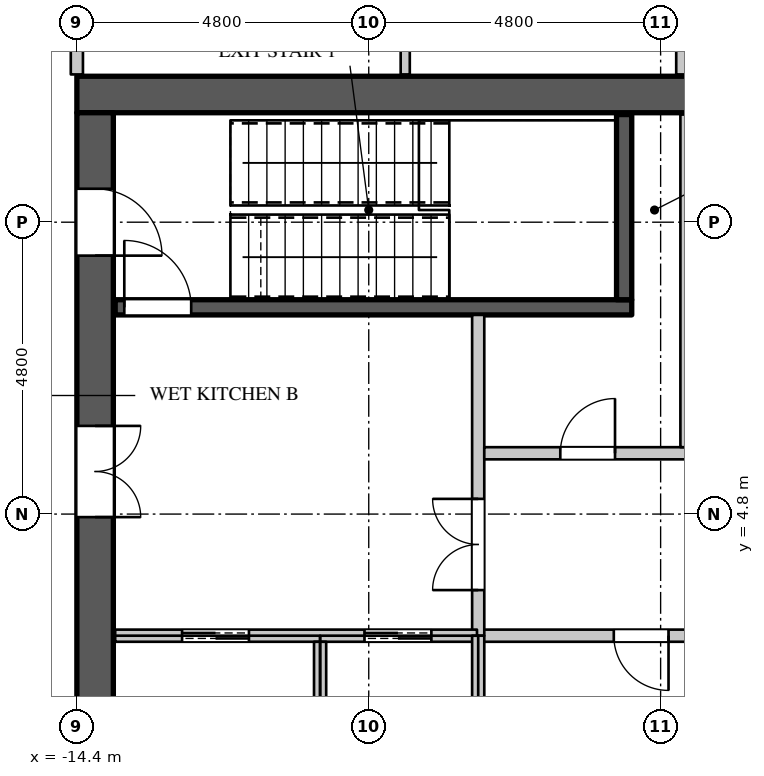
"""IFC4 building model, lengths in metres.
Left out: names, types, materials, properties, quantities, classifications, styles, units other than length and angle.
Written with IfcOpenShell. Run it as: python <this file> out.ifc"""

import sys

from ifc_helpers import new_model, si_unit, direction, frame, frame_2d, origin, place, context, subcontext, project, spatial, rectangle, extrude, element, fill, save


model = new_model("IFC4")
c1 = context("Model", 3, precision=1e-05, world=origin(), true_north=direction((0.0, 1.0)))
c2 = subcontext(c1, "Body", "Model", "MODEL_VIEW")
j1 = project(units=[si_unit("LENGTHUNIT", "METRE"), si_unit("PLANEANGLEUNIT", "RADIAN")], contexts=[c1])
p1 = place(None, origin())
s1 = spatial("IfcSite", under=j1, at=p1, CompositionType="ELEMENT")
p2 = place(p1, origin())
s2 = spatial("IfcBuilding", under=s1, at=p2, CompositionType="ELEMENT")
p3 = place(p2, frame((0.0, 0.0, 247.5)))
s3 = spatial("IfcBuildingStorey", under=s2, at=p3, CompositionType="ELEMENT", Elevation=247.5)
p4 = place(p3, frame((-14.4, 11.7, 0.0), z_axis=(0.0, 0.0, 1.0), x_axis=(1.0, 0.0, 0.0)))
e1 = element("IfcWall", 1, at=p4, inside=s3, PredefinedType="SHEAR", context=c2, shape_type="SweptSolid", body=[
    extrude(rectangle(XDim=28.8, YDim=0.6, at=frame_2d((14.4, 0.0))), origin(), (0.0, 0.0, 1.0), 4.2),
])
p5 = place(p3, frame((-14.1, -11.4, 0.0), z_axis=(0.0, 0.0, 1.0), x_axis=(0.0, 1.0, 0.0)))
e2 = element("IfcWall", 2, at=p5, inside=s3, PredefinedType="SHEAR", context=c2, shape_type="SweptSolid", body=[
    extrude(rectangle(XDim=22.8, YDim=0.6, at=frame_2d((11.4, 0.0))), origin(), (0.0, 0.0, 1.0), 4.2),
])
p6 = place(p5, frame((20.45, 0.0, 0.0)))
e3 = element("IfcOpeningElement", 3, at=p6, cuts=e2, PredefinedType="OPENING", context=c2, shape_type="SweptSolid", body=[
    extrude(rectangle(XDim=1.1, YDim=2.2, at=frame_2d((0.55, 1.1))), frame((0.0, 0.31, 0.0), z_axis=(0.0, -1.0, 0.0), x_axis=(1.0, 0.0, 0.0)), (0.0, 0.0, 1.0), 0.62),
])
p7 = place(p5, frame((1.25, 0.0, 0.0)))
e4 = element("IfcOpeningElement", 4, at=p7, cuts=e2, PredefinedType="OPENING", context=c2, shape_type="SweptSolid", body=[
    extrude(rectangle(XDim=1.1, YDim=2.2, at=frame_2d((0.55, 1.1))), frame((0.0, 0.31, 0.0), z_axis=(0.0, -1.0, 0.0), x_axis=(1.0, 0.0, 0.0)), (0.0, 0.0, 1.0), 0.62),
])
p8 = place(p5, frame((16.15, 0.0, 0.0)))
e5 = element("IfcOpeningElement", 5, at=p8, cuts=e2, PredefinedType="OPENING", context=c2, shape_type="SweptSolid", body=[
    extrude(rectangle(XDim=1.5, YDim=2.4, at=frame_2d((0.75, 1.2))), frame((0.0, 0.31, 0.0), z_axis=(0.0, -1.0, 0.0), x_axis=(1.0, 0.0, 0.0)), (0.0, 0.0, 1.0), 0.62),
])
p9 = place(p5, frame((5.15, 0.0, 0.0)))
e6 = element("IfcOpeningElement", 6, at=p9, cuts=e2, PredefinedType="OPENING", context=c2, shape_type="SweptSolid", body=[
    extrude(rectangle(XDim=1.5, YDim=2.4, at=frame_2d((0.75, 1.2))), frame((0.0, 0.31, 0.0), z_axis=(0.0, -1.0, 0.0), x_axis=(1.0, 0.0, 0.0)), (0.0, 0.0, 1.0), 0.62),
])
p10 = place(p3, frame((-14.4, 12.03, 0.0), z_axis=(0.0, 0.0, 1.0), x_axis=(0.0, 1.0, 0.0)))
e7 = element("IfcWall", 7, at=p10, inside=s3, PredefinedType="PARTITIONING", context=c2, shape_type="SweptSolid", body=[
    extrude(rectangle(XDim=2.27, YDim=0.2, at=frame_2d((1.135, 0.0))), origin(), (0.0, 0.0, 1.0), 3.95),
])
p11 = place(p3, frame((-7.82, 2.8, 0.0), z_axis=(0.0, 0.0, 1.0), x_axis=(1.0, 0.0, 0.0)))
e8 = element("IfcWall", 8, at=p11, inside=s3, PredefinedType="PARTITIONING", context=c2, shape_type="SweptSolid", body=[
    extrude(rectangle(XDim=11.44, YDim=0.2, at=frame_2d((5.72, 0.0))), origin(), (0.0, 0.0, 1.0), 3.95),
])
p12 = place(p11, frame((2.25, 0.0, 0.0)))
e9 = element("IfcOpeningElement", 9, at=p12, cuts=e8, PredefinedType="OPENING", context=c2, shape_type="SweptSolid", body=[
    extrude(rectangle(XDim=0.9, YDim=2.2, at=frame_2d((0.45, 1.1))), frame((0.0, 0.11, 0.0), z_axis=(0.0, -1.0, 0.0), x_axis=(1.0, 0.0, 0.0)), (0.0, 0.0, 1.0), 0.22),
])
p13 = place(p11, frame((7.8, 0.0, 0.0)))
e10 = element("IfcOpeningElement", 10, at=p13, cuts=e8, PredefinedType="OPENING", context=c2, shape_type="SweptSolid", body=[
    extrude(rectangle(XDim=0.9, YDim=2.2, at=frame_2d((0.45, 1.1))), frame((0.0, 0.11, 0.0), z_axis=(0.0, -1.0, 0.0), x_axis=(1.0, 0.0, 0.0)), (0.0, 0.0, 1.0), 0.22),
])
p14 = place(p3, frame((-7.8, 2.8, 0.0), z_axis=(0.0, 0.0, 1.0), x_axis=(0.0, 1.0, 0.0)))
e11 = element("IfcWall", 11, at=p14, inside=s3, PredefinedType="PARTITIONING", context=c2, shape_type="SweptSolid", body=[
    extrude(rectangle(XDim=5.275, YDim=0.2, at=frame_2d((2.637, 0.0))), origin(), (0.0, 0.0, 1.0), 3.95),
])
p15 = place(p14, frame((0.75, 0.0, 0.0)))
e12 = element("IfcOpeningElement", 12, at=p15, cuts=e11, PredefinedType="OPENING", context=c2, shape_type="SweptSolid", body=[
    extrude(rectangle(XDim=1.5, YDim=2.4, at=frame_2d((0.75, 1.2))), frame((0.0, 0.11, 0.0), z_axis=(0.0, -1.0, 0.0), x_axis=(1.0, 0.0, 0.0)), (0.0, 0.0, 1.0), 0.22),
])
p16 = place(p3, frame((-7.7, 5.8, 0.0), z_axis=(0.0, 0.0, 1.0), x_axis=(1.0, 0.0, 0.0)))
e13 = element("IfcWall", 13, at=p16, inside=s3, PredefinedType="PARTITIONING", context=c2, shape_type="SweptSolid", body=[
    extrude(rectangle(XDim=11.32, YDim=0.2, at=frame_2d((5.66, 0.0))), origin(), (0.0, 0.0, 1.0), 3.95),
])
p17 = place(p16, frame((1.25, 0.0, 0.0)))
e14 = element("IfcOpeningElement", 14, at=p17, cuts=e13, PredefinedType="OPENING", context=c2, shape_type="SweptSolid", body=[
    extrude(rectangle(XDim=0.9, YDim=2.2, at=frame_2d((0.45, 1.1))), frame((0.0, 0.11, 0.0), z_axis=(0.0, -1.0, 0.0), x_axis=(1.0, 0.0, 0.0)), (0.0, 0.0, 1.0), 0.22),
])
p18 = place(p16, frame((4.75, 0.0, 0.0)))
e15 = element("IfcOpeningElement", 15, at=p18, cuts=e13, PredefinedType="OPENING", context=c2, shape_type="SweptSolid", body=[
    extrude(rectangle(XDim=0.9, YDim=2.2, at=frame_2d((0.45, 1.1))), frame((0.0, 0.11, 0.0), z_axis=(0.0, -1.0, 0.0), x_axis=(1.0, 0.0, 0.0)), (0.0, 0.0, 1.0), 0.22),
])
p19 = place(p16, frame((8.65, 0.0, 0.0)))
e16 = element("IfcOpeningElement", 16, at=p19, cuts=e13, PredefinedType="OPENING", context=c2, shape_type="SweptSolid", body=[
    extrude(rectangle(XDim=0.9, YDim=2.2, at=frame_2d((0.45, 1.1))), frame((0.0, 0.11, 0.0), z_axis=(0.0, -1.0, 0.0), x_axis=(1.0, 0.0, 0.0)), (0.0, 0.0, 1.0), 0.22),
])
p20 = place(p3, frame((-9.0, 12.03, 0.0), z_axis=(0.0, 0.0, 1.0), x_axis=(0.0, 1.0, 0.0)))
e17 = element("IfcWall", 17, at=p20, inside=s3, PredefinedType="PARTITIONING", context=c2, shape_type="SweptSolid", body=[
    extrude(rectangle(XDim=4.995, YDim=0.15, at=frame_2d((2.498, 0.0))), origin(), (0.0, 0.0, 1.0), 3.95),
])
p21 = place(p20, frame((2.0, 0.0, 0.0)))
e18 = element("IfcOpeningElement", 18, at=p21, cuts=e17, PredefinedType="OPENING", context=c2, shape_type="SweptSolid", body=[
    extrude(rectangle(XDim=0.95, YDim=2.2, at=frame_2d((0.475, 1.1))), frame((0.0, 0.085, 0.0), z_axis=(0.0, -1.0, 0.0), x_axis=(1.0, 0.0, 0.0)), (0.0, 0.0, 1.0), 0.17),
])
p22 = place(p3, frame((-4.469, 12.03, 0.0), z_axis=(0.0, 0.0, 1.0), x_axis=(0.0, 1.0, 0.0)))
e19 = element("IfcWall", 19, at=p22, inside=s3, PredefinedType="PARTITIONING", context=c2, shape_type="SweptSolid", body=[
    extrude(rectangle(XDim=13.92, YDim=0.15, at=frame_2d((6.96, 0.0))), origin(), (0.0, 0.0, 1.0), 3.3),
])
p23 = place(p22, frame((9.1, 0.0, 0.0)))
e20 = element("IfcOpeningElement", 20, at=p23, cuts=e19, PredefinedType="OPENING", context=c2, shape_type="SweptSolid", body=[
    extrude(rectangle(XDim=0.95, YDim=2.2, at=frame_2d((0.475, 1.1))), frame((0.0, 0.085, 0.0), z_axis=(0.0, -1.0, 0.0), x_axis=(1.0, 0.0, 0.0)), (0.0, 0.0, 1.0), 0.17),
])
p24 = place(p3, frame((-4.4, 5.9, 0.0), z_axis=(0.0, 0.0, 1.0), x_axis=(0.0, 1.0, 0.0)))
e21 = element("IfcWall", 21, at=p24, inside=s3, PredefinedType="PARTITIONING", context=c2, shape_type="SweptSolid", body=[
    extrude(rectangle(XDim=5.47, YDim=0.15, at=frame_2d((2.735, 0.0))), origin(), (0.0, 0.0, 1.0), 3.95),
])
p25 = place(p3, frame((-13.77, 2.8, 0.0), z_axis=(0.0, 0.0, 1.0), x_axis=(1.0, 0.0, 0.0)))
e22 = element("IfcWall", 22, at=p25, inside=s3, PredefinedType="PARTITIONING", context=c2, shape_type="SweptSolid", body=[
    extrude(rectangle(XDim=5.95, YDim=0.2, at=frame_2d((2.975, 0.0))), origin(), (0.0, 0.0, 1.0), 3.95),
])
p26 = place(p25, frame((1.1, 0.0, 0.0)))
e23 = element("IfcOpeningElement", 23, at=p26, cuts=e22, PredefinedType="OPENING", context=c2, shape_type="SweptSolid", body=[
    extrude(rectangle(XDim=1.1, YDim=2.2, at=frame_2d((0.55, 1.1))), frame((0.0, 0.11, 0.0), z_axis=(0.0, -1.0, 0.0), x_axis=(1.0, 0.0, 0.0)), (0.0, 0.0, 1.0), 0.22),
])
p27 = place(p25, frame((4.1, 0.0, 0.0)))
e24 = element("IfcOpeningElement", 24, at=p27, cuts=e22, PredefinedType="OPENING", context=c2, shape_type="SweptSolid", body=[
    extrude(rectangle(XDim=1.1, YDim=2.2, at=frame_2d((0.55, 1.1))), frame((0.0, 0.11, 0.0), z_axis=(0.0, -1.0, 0.0), x_axis=(1.0, 0.0, 0.0)), (0.0, 0.0, 1.0), 0.22),
])
p28 = place(p3, frame((-10.4, 0.0, 0.0), z_axis=(0.0, 0.0, 1.0), x_axis=(0.0, 1.0, 0.0)))
e25 = element("IfcWall", 25, at=p28, inside=s3, PredefinedType="PARTITIONING", context=c2, shape_type="SweptSolid", body=[
    extrude(rectangle(XDim=2.7, YDim=0.2, at=frame_2d((1.35, 0.0))), origin(), (0.0, 0.0, 1.0), 3.95),
])
p29 = place(p3, frame((-7.8, 0.0, 0.0), z_axis=(0.0, 0.0, 1.0), x_axis=(0.0, 1.0, 0.0)))
e26 = element("IfcWall", 26, at=p29, inside=s3, PredefinedType="PARTITIONING", context=c2, shape_type="SweptSolid", body=[
    extrude(rectangle(XDim=2.8, YDim=0.2, at=frame_2d((1.4, 0.0))), origin(), (0.0, 0.0, 1.0), 3.95),
])
p30 = place(p3, frame((-13.77, 8.2, 0.0), z_axis=(0.0, 0.0, 1.0), x_axis=(1.0, 0.0, 0.0)))
e27 = element("IfcWall", 27, at=p30, inside=s3, PredefinedType="SHEAR", context=c2, shape_type="SweptSolid", body=[
    extrude(rectangle(XDim=8.495, YDim=0.25, at=frame_2d((4.248, 0.0))), origin(), (0.0, 0.0, 1.0), 3.95),
])
p31 = place(p30, frame((0.15, 0.0, 0.0)))
e28 = element("IfcOpeningElement", 28, at=p31, cuts=e27, PredefinedType="OPENING", context=c2, shape_type="SweptSolid", body=[
    extrude(rectangle(XDim=1.1, YDim=2.2, at=frame_2d((0.55, 1.1))), frame((0.0, 0.135, 0.0), z_axis=(0.0, -1.0, 0.0), x_axis=(1.0, 0.0, 0.0)), (0.0, 0.0, 1.0), 0.27),
])
p32 = place(p3, frame((-5.4, 8.325, 0.0), z_axis=(0.0, 0.0, 1.0), x_axis=(0.0, 1.0, 0.0)))
e29 = element("IfcWall", 29, at=p32, inside=s3, PredefinedType="SHEAR", context=c2, shape_type="SweptSolid", body=[
    extrude(rectangle(XDim=3.045, YDim=0.25, at=frame_2d((1.522, 0.0))), origin(), (0.0, 0.0, 1.0), 3.95),
])
p33 = place(p17, origin())
e30 = element("IfcDoor", 30, at=p33, inside=s3, OperationType="SINGLE_SWING_RIGHT", PredefinedType="DOOR", context=c2, shape_type="SweptSolid", body=[
    extrude(rectangle(XDim=0.9, YDim=2.2, at=frame_2d((0.45, 1.1))), frame((0.0, 0.025, 0.0), z_axis=(0.0, -1.0, 0.0), x_axis=(1.0, 0.0, 0.0)), (0.0, 0.0, 1.0), 0.05),
])
fill(e14, e30)
p34 = place(p12, origin())
e31 = element("IfcDoor", 31, at=p34, inside=s3, OperationType="SINGLE_SWING_LEFT", PredefinedType="DOOR", context=c2, shape_type="SweptSolid", body=[
    extrude(rectangle(XDim=0.9, YDim=2.2, at=frame_2d((0.45, 1.1))), frame((0.0, 0.025, 0.0), z_axis=(0.0, -1.0, 0.0), x_axis=(1.0, 0.0, 0.0)), (0.0, 0.0, 1.0), 0.05),
])
fill(e9, e31)
p35 = place(p26, origin())
e32 = element("IfcDoor", 32, at=p35, inside=s3, OperationType="DOUBLE_DOOR_SLIDING", PredefinedType="DOOR", context=c2, shape_type="SweptSolid", body=[
    extrude(rectangle(XDim=1.1, YDim=2.2, at=frame_2d((0.55, 1.1))), frame((0.0, 0.025, 0.0), z_axis=(0.0, -1.0, 0.0), x_axis=(1.0, 0.0, 0.0)), (0.0, 0.0, 1.0), 0.05),
])
fill(e23, e32)
p36 = place(p27, origin())
e33 = element("IfcDoor", 33, at=p36, inside=s3, OperationType="DOUBLE_DOOR_SLIDING", PredefinedType="DOOR", context=c2, shape_type="SweptSolid", body=[
    extrude(rectangle(XDim=1.1, YDim=2.2, at=frame_2d((0.55, 1.1))), frame((0.0, 0.025, 0.0), z_axis=(0.0, -1.0, 0.0), x_axis=(1.0, 0.0, 0.0)), (0.0, 0.0, 1.0), 0.05),
])
fill(e24, e33)
p37 = place(p31, origin())
e34 = element("IfcDoor", 34, at=p37, inside=s3, OperationType="SINGLE_SWING_LEFT", PredefinedType="DOOR", context=c2, shape_type="SweptSolid", body=[
    extrude(rectangle(XDim=1.1, YDim=2.2, at=frame_2d((0.55, 1.1))), frame((0.0, 0.025, 0.0), z_axis=(0.0, -1.0, 0.0), x_axis=(1.0, 0.0, 0.0)), (0.0, 0.0, 1.0), 0.05),
])
fill(e28, e34)
p38 = place(p15, origin())
e35 = element("IfcDoor", 35, at=p38, inside=s3, OperationType="DOUBLE_DOOR_SINGLE_SWING", PredefinedType="DOOR", context=c2, shape_type="SweptSolid", body=[
    extrude(rectangle(XDim=1.5, YDim=2.4, at=frame_2d((0.75, 1.2))), frame((0.0, 0.025, 0.0), z_axis=(0.0, -1.0, 0.0), x_axis=(1.0, 0.0, 0.0)), (0.0, 0.0, 1.0), 0.05),
])
fill(e12, e35)
p39 = place(p6, origin())
e36 = element("IfcDoor", 36, at=p39, inside=s3, OperationType="SINGLE_SWING_RIGHT", PredefinedType="DOOR", context=c2, shape_type="SweptSolid", body=[
    extrude(rectangle(XDim=1.1, YDim=2.2, at=frame_2d((0.55, 1.1))), frame((0.0, -0.245, 0.0), z_axis=(0.0, -1.0, 0.0), x_axis=(1.0, 0.0, 0.0)), (0.0, 0.0, 1.0), 0.05),
])
fill(e3, e36)
p40 = place(p8, origin())
e37 = element("IfcDoor", 37, at=p40, inside=s3, OperationType="DOUBLE_DOOR_SINGLE_SWING", PredefinedType="DOOR", context=c2, shape_type="SweptSolid", body=[
    extrude(rectangle(XDim=1.5, YDim=2.4, at=frame_2d((0.75, 1.2))), frame((0.0, -0.245, 0.0), z_axis=(0.0, -1.0, 0.0), x_axis=(1.0, 0.0, 0.0)), (0.0, 0.0, 1.0), 0.05),
])
fill(e5, e37)
save(model, sys.argv[1])
